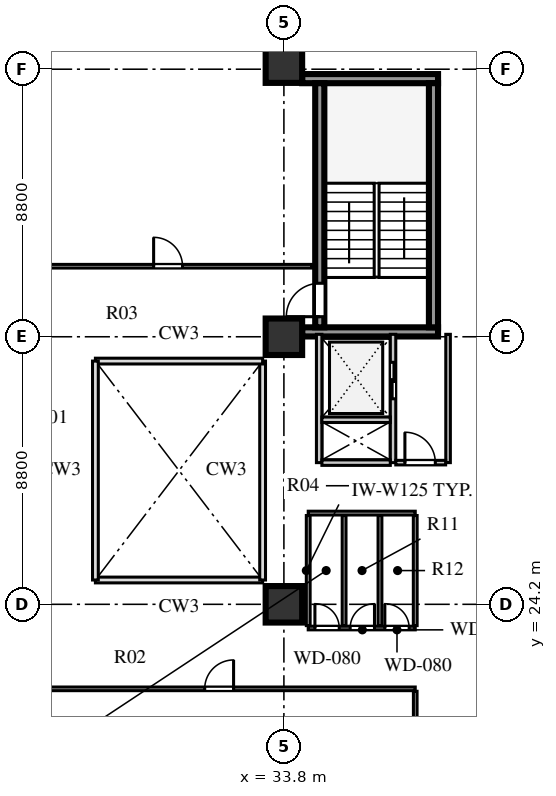
"""IFC4 building model, lengths in metres.
Left out: names, types, materials, properties, quantities, classifications, styles, units other than length and angle.
Written with IfcOpenShell. Run it as: python <this file> out.ifc"""

import sys

from ifc_helpers import new_model, si_unit, direction, frame, frame_2d, origin, origin_2d, place, context, subcontext, project, spatial, rectangle, extrude, element, fill, save


model = new_model("IFC4")
c1 = context("Model", 3, precision=1e-05, world=origin(), true_north=direction((0.0, 1.0)))
c2 = subcontext(c1, "Body", "Model", "MODEL_VIEW")
j1 = project(units=[si_unit("LENGTHUNIT", "METRE"), si_unit("PLANEANGLEUNIT", "RADIAN")], contexts=[c1])
p1 = place(None, origin())
s1 = spatial("IfcSite", under=j1, at=p1, CompositionType="ELEMENT")
p2 = place(p1, origin())
s2 = spatial("IfcBuilding", under=s1, at=p2, CompositionType="ELEMENT")
p3 = place(p2, frame((0.0, 0.0, 26.0)))
s3 = spatial("IfcBuildingStorey", under=s2, at=p3, CompositionType="ELEMENT", Elevation=26.0)
for number, where, z_axis, x_axis in (
    (1, (34.4, 33.16, 0.0), (0.0, 0.0, 1.0), (1.0, 0.0, 0.0)),
    (2, (34.4, 41.49, 0.0), (0.0, 0.0, 1.0), (1.0, 0.0, 0.0)),
):
    element("IfcWall", number, at=place(p3, frame(where, z_axis=z_axis, x_axis=x_axis)), inside=s3, PredefinedType="SHEAR", context=c2, shape_type="SweptSolid", body=[
        extrude(rectangle(XDim=4.47, YDim=0.3, at=frame_2d((2.235, 0.0))), origin(), (0.0, 0.0, 1.0), 3.72),
    ])
p4 = place(p3, frame((34.98, 33.31, 0.0), z_axis=(0.0, 0.0, 1.0), x_axis=(0.0, 1.0, 0.0)))
e3 = element("IfcWall", 3, at=p4, inside=s3, PredefinedType="SHEAR", context=c2, shape_type="SweptSolid", body=[
    extrude(rectangle(XDim=8.03, YDim=0.3, at=frame_2d((4.015, 0.0))), origin(), (0.0, 0.0, 1.0), 3.72),
])
p5 = place(p4, frame((0.35, 0.0, 0.0)))
e4 = element("IfcOpeningElement", 4, at=p5, cuts=e3, PredefinedType="OPENING", context=c2, shape_type="SweptSolid", body=[
    extrude(rectangle(XDim=1.1, YDim=2.1, at=frame_2d((0.55, 1.05))), frame((0.0, 0.16, 0.0), z_axis=(0.0, -1.0, 0.0), x_axis=(1.0, 0.0, 0.0)), (0.0, 0.0, 1.0), 0.32),
])
p6 = place(p3, frame((38.72, 33.31, 0.0), z_axis=(0.0, 0.0, 1.0), x_axis=(0.0, 1.0, 0.0)))
e5 = element("IfcWall", 5, at=p6, inside=s3, PredefinedType="SHEAR", context=c2, shape_type="SweptSolid", body=[
    extrude(rectangle(XDim=8.03, YDim=0.3, at=frame_2d((4.015, 0.0))), origin(), (0.0, 0.0, 1.0), 3.72),
])
for number, where, z_axis, x_axis in (
    (6, (33.8, 24.2, 0.0), (0.0, 0.0, 1.0), (1.0, 0.0, 0.0)),
    (7, (33.8, 33.0, 0.0), (0.0, 0.0, 1.0), (1.0, 0.0, 0.0)),
    (8, (33.8, 41.95, 0.0), (0.0, 0.0, 1.0), (1.0, 0.0, 0.0)),
):
    element("IfcColumn", number, at=place(p3, frame(where, z_axis=z_axis, x_axis=x_axis)), inside=s3, PredefinedType="COLUMN", context=c2, shape_type="SweptSolid", body=[
        extrude(rectangle(XDim=1.2, YDim=1.2, at=origin_2d()), origin(), (0.0, 0.0, 1.0), 3.72),
    ])
p7 = place(p3, frame((34.96, 28.86, 0.0), z_axis=(0.0, 0.0, 1.0), x_axis=(0.0, 1.0, 0.0)))
e9 = element("IfcWall", 9, at=p7, inside=s3, PredefinedType="SOLIDWALL", context=c2, shape_type="SweptSolid", body=[
    extrude(rectangle(XDim=4.22, YDim=0.18, at=frame_2d((2.11, 0.0))), origin(), (0.0, 0.0, 1.0), 3.72),
])
p8 = place(p3, frame((37.39, 28.86, 0.0), z_axis=(0.0, 0.0, 1.0), x_axis=(0.0, 1.0, 0.0)))
e10 = element("IfcWall", 10, at=p8, inside=s3, PredefinedType="SOLIDWALL", context=c2, shape_type="SweptSolid", body=[
    extrude(rectangle(XDim=4.22, YDim=0.18, at=frame_2d((2.11, 0.0))), origin(), (0.0, 0.0, 1.0), 3.72),
])
p9 = place(p8, frame((2.1, 0.0, 0.0)))
e11 = element("IfcOpeningElement", 11, at=p9, cuts=e10, PredefinedType="OPENING", context=c2, shape_type="SweptSolid", body=[
    extrude(rectangle(XDim=1.2, YDim=2.12, at=frame_2d((0.6, 1.06))), frame((0.0, 0.1, 0.0), z_axis=(0.0, -1.0, 0.0), x_axis=(1.0, 0.0, 0.0)), (0.0, 0.0, 1.0), 0.2),
])
for number, where, z_axis, x_axis in (
    (12, (35.05, 28.86, 0.0), (0.0, 0.0, 1.0), (1.0, 0.0, 0.0)),
    (13, (35.05, 30.27, 0.0), (0.0, 0.0, 1.0), (1.0, 0.0, 0.0)),
):
    element("IfcWall", number, at=place(p3, frame(where, z_axis=z_axis, x_axis=x_axis)), inside=s3, PredefinedType="SOLIDWALL", context=c2, shape_type="SweptSolid", body=[
        extrude(rectangle(XDim=2.25, YDim=0.18, at=frame_2d((1.125, 0.0))), origin(), (0.0, 0.0, 1.0), 3.72),
    ])
p10 = place(p3, frame((39.2, 28.86, 0.0), z_axis=(0.0, 0.0, 1.0), x_axis=(0.0, 1.0, 0.0)))
e14 = element("IfcWall", 14, at=p10, inside=s3, PredefinedType="PARTITIONING", context=c2, shape_type="SweptSolid", body=[
    extrude(rectangle(XDim=4.22, YDim=0.15, at=frame_2d((2.11, 0.0))), origin(), (0.0, 0.0, 1.0), 3.72),
])
p11 = place(p3, frame((37.48, 28.86, 0.0), z_axis=(0.0, 0.0, 1.0), x_axis=(1.0, 0.0, 0.0)))
e15 = element("IfcWall", 15, at=p11, inside=s3, PredefinedType="PARTITIONING", context=c2, shape_type="SweptSolid", body=[
    extrude(rectangle(XDim=1.64, YDim=0.15, at=frame_2d((0.82, 0.0))), origin(), (0.0, 0.0, 1.0), 3.72),
])
p12 = place(p11, frame((0.3, 0.0, 0.0)))
e16 = element("IfcOpeningElement", 16, at=p12, cuts=e15, PredefinedType="OPENING", context=c2, shape_type="SweptSolid", body=[
    extrude(rectangle(XDim=1.0, YDim=2.1, at=frame_2d((0.5, 1.05))), frame((0.0, 0.085, 0.0), z_axis=(0.0, -1.0, 0.0), x_axis=(1.0, 0.0, 0.0)), (0.0, 0.0, 1.0), 0.17),
])
p13 = place(p3, frame((25.25, 21.42, 0.0), z_axis=(0.0, 0.0, 1.0), x_axis=(1.0, 0.0, 0.0)))
e17 = element("IfcWall", 17, at=p13, inside=s3, PredefinedType="PARTITIONING", context=c2, shape_type="SweptSolid", body=[
    extrude(rectangle(XDim=12.87, YDim=0.12, at=frame_2d((6.435, 0.0))), origin(), (0.0, 0.0, 1.0), 3.32),
])
p14 = place(p13, frame((5.945, 0.0, 0.0)))
e18 = element("IfcOpeningElement", 18, at=p14, cuts=e17, PredefinedType="OPENING", context=c2, shape_type="SweptSolid", body=[
    extrude(rectangle(XDim=0.95, YDim=2.08, at=frame_2d((0.475, 1.04))), frame((0.0, 0.07, 0.0), z_axis=(0.0, -1.0, 0.0), x_axis=(1.0, 0.0, 0.0)), (0.0, 0.0, 1.0), 0.14),
])
p15 = place(p3, frame((38.12, 6.88, 0.0), z_axis=(0.0, 0.0, 1.0), x_axis=(0.0, 1.0, 0.0)))
e19 = element("IfcWall", 19, at=p15, inside=s3, PredefinedType="PARTITIONING", context=c2, shape_type="SweptSolid", body=[
    extrude(rectangle(XDim=14.46, YDim=0.12, at=frame_2d((7.23, 0.0))), origin(), (0.0, 0.0, 1.0), 3.72),
])
p16 = place(p3, frame((34.6, 23.42, 0.0), z_axis=(0.0, 0.0, 1.0), x_axis=(1.0, 0.0, 0.0)))
e20 = element("IfcWall", 20, at=p16, inside=s3, PredefinedType="PARTITIONING", context=c2, shape_type="SweptSolid", body=[
    extrude(rectangle(XDim=3.52, YDim=0.12, at=frame_2d((1.76, 0.0))), origin(), (0.0, 0.0, 1.0), 3.72),
])
p17 = place(p16, frame((0.22, 0.0, 0.0)))
e21 = element("IfcOpeningElement", 21, at=p17, cuts=e20, PredefinedType="OPENING", context=c2, shape_type="SweptSolid", body=[
    extrude(rectangle(XDim=0.8, YDim=2.05, at=frame_2d((0.4, 1.025))), frame((0.0, 0.07, 0.0), z_axis=(0.0, -1.0, 0.0), x_axis=(1.0, 0.0, 0.0)), (0.0, 0.0, 1.0), 0.14),
])
p18 = place(p16, frame((1.38, 0.0, 0.0)))
e22 = element("IfcOpeningElement", 22, at=p18, cuts=e20, PredefinedType="OPENING", context=c2, shape_type="SweptSolid", body=[
    extrude(rectangle(XDim=0.8, YDim=2.05, at=frame_2d((0.4, 1.025))), frame((0.0, 0.07, 0.0), z_axis=(0.0, -1.0, 0.0), x_axis=(1.0, 0.0, 0.0)), (0.0, 0.0, 1.0), 0.14),
])
p19 = place(p16, frame((2.52, 0.0, 0.0)))
e23 = element("IfcOpeningElement", 23, at=p19, cuts=e20, PredefinedType="OPENING", context=c2, shape_type="SweptSolid", body=[
    extrude(rectangle(XDim=0.8, YDim=2.05, at=frame_2d((0.4, 1.025))), frame((0.0, 0.07, 0.0), z_axis=(0.0, -1.0, 0.0), x_axis=(1.0, 0.0, 0.0)), (0.0, 0.0, 1.0), 0.14),
])
p20 = place(p3, frame((25.25, 35.32, 0.0), z_axis=(0.0, 0.0, 1.0), x_axis=(1.0, 0.0, 0.0)))
e24 = element("IfcWall", 24, at=p20, inside=s3, PredefinedType="PARTITIONING", context=c2, shape_type="SweptSolid", body=[
    extrude(rectangle(XDim=9.47, YDim=0.12, at=frame_2d((4.735, 0.0))), origin(), (0.0, 0.0, 1.0), 3.72),
])
p21 = place(p20, frame((4.265, 0.0, 0.0)))
e25 = element("IfcOpeningElement", 25, at=p21, cuts=e24, PredefinedType="OPENING", context=c2, shape_type="SweptSolid", body=[
    extrude(rectangle(XDim=0.95, YDim=2.08, at=frame_2d((0.475, 1.04))), frame((0.0, 0.07, 0.0), z_axis=(0.0, -1.0, 0.0), x_axis=(1.0, 0.0, 0.0)), (0.0, 0.0, 1.0), 0.14),
])
p22 = place(p3, frame((34.6, 27.2, 0.0), z_axis=(0.0, 0.0, 1.0), x_axis=(1.0, 0.0, 0.0)))
e26 = element("IfcWall", 26, at=p22, inside=s3, PredefinedType="PLUMBINGWALL", context=c2, shape_type="SweptSolid", body=[
    extrude(rectangle(XDim=3.52, YDim=0.125, at=frame_2d((1.76, 0.0))), origin(), (0.0, 0.0, 1.0), 3.32),
])
for number, where, z_axis, x_axis in (
    (27, (34.6, 23.5, 0.0), (0.0, 0.0, 1.0), (0.0, 1.0, 0.0)),
    (28, (38.12, 23.5, 0.0), (0.0, 0.0, 1.0), (0.0, 1.0, 0.0)),
    (29, (35.78, 23.5, 0.0), (0.0, 0.0, 1.0), (0.0, 1.0, 0.0)),
    (30, (36.96, 23.5, 0.0), (0.0, 0.0, 1.0), (0.0, 1.0, 0.0)),
):
    element("IfcWall", number, at=place(p3, frame(where, z_axis=z_axis, x_axis=x_axis)), inside=s3, PredefinedType="PLUMBINGWALL", context=c2, shape_type="SweptSolid", body=[
        extrude(rectangle(XDim=3.62, YDim=0.125, at=frame_2d((1.81, 0.0))), origin(), (0.0, 0.0, 1.0), 3.72),
    ])
p23 = place(p5, origin())
e31 = element("IfcDoor", 31, at=p23, inside=s3, OperationType="SINGLE_SWING_LEFT", PredefinedType="DOOR", context=c2, shape_type="SweptSolid", body=[
    extrude(rectangle(XDim=1.1, YDim=2.1, at=frame_2d((0.55, 1.05))), frame((0.0, 0.025, 0.0), z_axis=(0.0, -1.0, 0.0), x_axis=(1.0, 0.0, 0.0)), (0.0, 0.0, 1.0), 0.05),
])
fill(e4, e31)
p24 = place(p9, frame((1.2, 0.0, 0.0), z_axis=(0.0, 0.0, 1.0), x_axis=(-1.0, 0.0, 0.0)))
e32 = element("IfcDoor", 32, at=p24, inside=s3, OperationType="DOUBLE_DOOR_SLIDING", PredefinedType="DOOR", context=c2, shape_type="SweptSolid", body=[
    extrude(rectangle(XDim=1.2, YDim=2.12, at=frame_2d((0.6, 1.06))), frame((0.0, 0.025, 0.0), z_axis=(0.0, -1.0, 0.0), x_axis=(1.0, 0.0, 0.0)), (0.0, 0.0, 1.0), 0.05),
])
fill(e11, e32)
p25 = place(p12, origin())
e33 = element("IfcDoor", 33, at=p25, inside=s3, OperationType="SINGLE_SWING_LEFT", PredefinedType="DOOR", context=c2, shape_type="SweptSolid", body=[
    extrude(rectangle(XDim=1.0, YDim=2.1, at=frame_2d((0.5, 1.05))), frame((0.0, 0.025, 0.0), z_axis=(0.0, -1.0, 0.0), x_axis=(1.0, 0.0, 0.0)), (0.0, 0.0, 1.0), 0.05),
])
fill(e16, e33)
p26 = place(p17, origin())
e34 = element("IfcDoor", 34, at=p26, inside=s3, OperationType="SINGLE_SWING_LEFT", PredefinedType="DOOR", context=c2, shape_type="SweptSolid", body=[
    extrude(rectangle(XDim=0.8, YDim=2.05, at=frame_2d((0.4, 1.025))), frame((0.0, 0.025, 0.0), z_axis=(0.0, -1.0, 0.0), x_axis=(1.0, 0.0, 0.0)), (0.0, 0.0, 1.0), 0.05),
])
fill(e21, e34)
p27 = place(p18, origin())
e35 = element("IfcDoor", 35, at=p27, inside=s3, OperationType="SINGLE_SWING_RIGHT", PredefinedType="DOOR", context=c2, shape_type="SweptSolid", body=[
    extrude(rectangle(XDim=0.8, YDim=2.05, at=frame_2d((0.4, 1.025))), frame((0.0, 0.025, 0.0), z_axis=(0.0, -1.0, 0.0), x_axis=(1.0, 0.0, 0.0)), (0.0, 0.0, 1.0), 0.05),
])
fill(e22, e35)
p28 = place(p19, origin())
e36 = element("IfcDoor", 36, at=p28, inside=s3, OperationType="SINGLE_SWING_LEFT", PredefinedType="DOOR", context=c2, shape_type="SweptSolid", body=[
    extrude(rectangle(XDim=0.8, YDim=2.05, at=frame_2d((0.4, 1.025))), frame((0.0, 0.025, 0.0), z_axis=(0.0, -1.0, 0.0), x_axis=(1.0, 0.0, 0.0)), (0.0, 0.0, 1.0), 0.05),
])
fill(e23, e36)
p29 = place(p14, frame((0.95, 0.0, 0.0), z_axis=(0.0, 0.0, 1.0), x_axis=(-1.0, 0.0, 0.0)))
e37 = element("IfcDoor", 37, at=p29, inside=s3, OperationType="SINGLE_SWING_LEFT", PredefinedType="DOOR", context=c2, shape_type="SweptSolid", body=[
    extrude(rectangle(XDim=0.95, YDim=2.08, at=frame_2d((0.475, 1.04))), frame((0.0, 0.025, 0.0), z_axis=(0.0, -1.0, 0.0), x_axis=(1.0, 0.0, 0.0)), (0.0, 0.0, 1.0), 0.05),
])
fill(e18, e37)
p30 = place(p21, origin())
e38 = element("IfcDoor", 38, at=p30, inside=s3, OperationType="SINGLE_SWING_LEFT", PredefinedType="DOOR", context=c2, shape_type="SweptSolid", body=[
    extrude(rectangle(XDim=0.95, YDim=2.08, at=frame_2d((0.475, 1.04))), frame((0.0, 0.025, 0.0), z_axis=(0.0, -1.0, 0.0), x_axis=(1.0, 0.0, 0.0)), (0.0, 0.0, 1.0), 0.05),
])
fill(e25, e38)
save(model, sys.argv[1])
